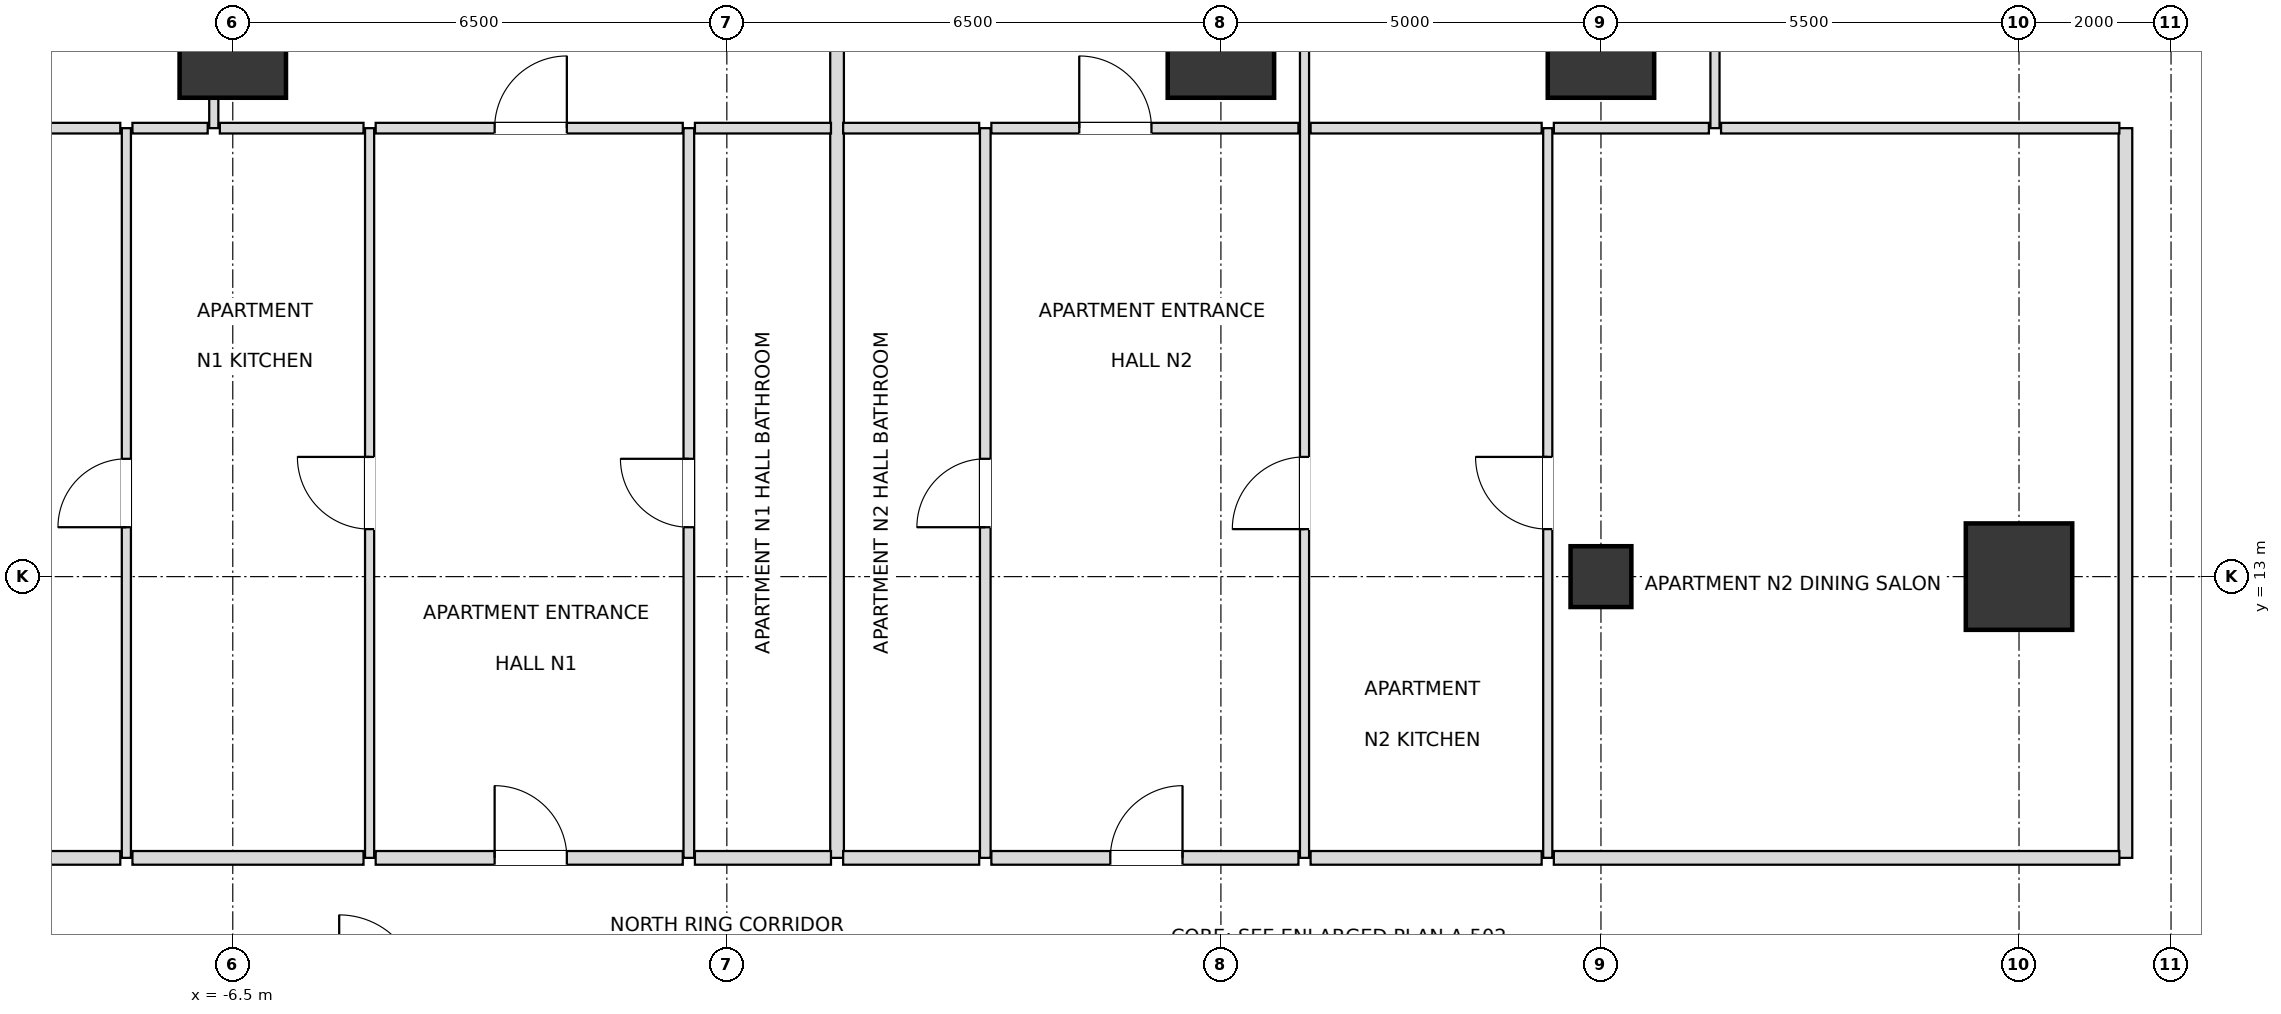
"""IFC4 building model, lengths in metres.
Left out: names, types, materials, properties, quantities, classifications, styles, units other than length and angle.
Written with IfcOpenShell. Run it as: python <this file> out.ifc"""

import sys

from ifc_helpers import new_model, si_unit, direction, frame, frame_2d, origin, origin_2d, place, context, subcontext, project, spatial, rectangle, extrude, element, fill, save


model = new_model("IFC4")
c1 = context("Model", 3, precision=1e-05, world=origin(), true_north=direction((0.0, 1.0)))
c2 = subcontext(c1, "Body", "Model", "MODEL_VIEW")
j1 = project(units=[si_unit("LENGTHUNIT", "METRE"), si_unit("PLANEANGLEUNIT", "RADIAN")], contexts=[c1])
p1 = place(None, origin())
s1 = spatial("IfcSite", under=j1, at=p1, CompositionType="ELEMENT")
p2 = place(p1, origin())
s2 = spatial("IfcBuilding", under=s1, at=p2, CompositionType="ELEMENT")
p3 = place(p2, frame((0.0, 0.0, 90.0)))
s3 = spatial("IfcBuildingStorey", under=s2, at=p3, CompositionType="ELEMENT", Elevation=90.0)
for number, where, z_axis, x_axis in (
    (1, (17.0, 13.0, 0.0), (0.0, 0.0, 1.0), (1.0, 0.0, 0.0)),
    (2, (11.5, 20.0, 0.0), (0.0, 0.0, 1.0), (1.0, 0.0, 0.0)),
    (3, (6.5, 20.0, 0.0), (0.0, 0.0, 1.0), (1.0, 0.0, 0.0)),
    (4, (-6.5, 20.0, 0.0), (0.0, 0.0, 1.0), (1.0, 0.0, 0.0)),
):
    element("IfcColumn", number, at=place(p3, frame(where, z_axis=z_axis, x_axis=x_axis)), inside=s3, PredefinedType="USERDEFINED", context=c2, shape_type="SweptSolid", body=[
        extrude(rectangle(XDim=1.4, YDim=1.4, at=origin_2d()), origin(), (0.0, 0.0, 1.0), 3.6),
    ])
p4 = place(p3, frame((11.5, 13.0, 0.0), z_axis=(0.0, 0.0, 1.0), x_axis=(1.0, 0.0, 0.0)))
e5 = element("IfcColumn", 5, at=p4, inside=s3, PredefinedType="COLUMN", context=c2, shape_type="SweptSolid", body=[
    extrude(rectangle(XDim=0.8, YDim=0.8, at=origin_2d()), origin(), (0.0, 0.0, 1.0), 3.6),
])
p5 = place(p3, frame((-7.9, 9.3, 0.0), z_axis=(0.0, 0.0, 1.0), x_axis=(0.0, 1.0, 0.0)))
e6 = element("IfcWall", 6, at=p5, inside=s3, PredefinedType="PARTITIONING", context=c2, shape_type="SweptSolid", body=[
    extrude(rectangle(XDim=9.6, YDim=0.12, at=frame_2d((4.8, 0.0))), origin(), (0.0, 0.0, 1.0), 2.736),
])
p6 = place(p5, frame((4.35, 0.0, 0.0)))
e7 = element("IfcOpeningElement", 7, at=p6, cuts=e6, PredefinedType="OPENING", context=c2, shape_type="SweptSolid", body=[
    extrude(rectangle(XDim=0.9, YDim=2.1, at=frame_2d((0.45, 1.05))), frame((0.0, 0.07, 0.0), z_axis=(0.0, -1.0, 0.0), x_axis=(1.0, 0.0, 0.0)), (0.0, 0.0, 1.0), 0.14),
])
p7 = place(p3, frame((-6.75, 18.9, 0.0), z_axis=(0.0, 0.0, 1.0), x_axis=(0.0, 1.0, 0.0)))
e8 = element("IfcWall", 8, at=p7, inside=s3, PredefinedType="PARTITIONING", context=c2, shape_type="SweptSolid", body=[
    extrude(rectangle(XDim=6.0, YDim=0.12, at=frame_2d((3.0, 0.0))), origin(), (0.0, 0.0, 1.0), 2.736),
])
p8 = place(p7, frame((2.55, 0.0, 0.0)))
e9 = element("IfcOpeningElement", 9, at=p8, cuts=e8, PredefinedType="OPENING", context=c2, shape_type="SweptSolid", body=[
    extrude(rectangle(XDim=0.9, YDim=2.1, at=frame_2d((0.45, 1.05))), frame((0.0, 0.07, 0.0), z_axis=(0.0, -1.0, 0.0), x_axis=(1.0, 0.0, 0.0)), (0.0, 0.0, 1.0), 0.14),
])
p9 = place(p3, frame((-4.7, 9.3, 0.0), z_axis=(0.0, 0.0, 1.0), x_axis=(0.0, 1.0, 0.0)))
e10 = element("IfcWall", 10, at=p9, inside=s3, PredefinedType="PARTITIONING", context=c2, shape_type="SweptSolid", body=[
    extrude(rectangle(XDim=9.6, YDim=0.12, at=frame_2d((4.8, 0.0))), origin(), (0.0, 0.0, 1.0), 2.868),
])
p10 = place(p9, frame((4.325, 0.0, 0.0)))
e11 = element("IfcOpeningElement", 11, at=p10, cuts=e10, PredefinedType="OPENING", context=c2, shape_type="SweptSolid", body=[
    extrude(rectangle(XDim=0.95, YDim=2.1, at=frame_2d((0.475, 1.05))), frame((0.0, 0.07, 0.0), z_axis=(0.0, -1.0, 0.0), x_axis=(1.0, 0.0, 0.0)), (0.0, 0.0, 1.0), 0.14),
])
p11 = place(p3, frame((-0.5, 9.3, 0.0), z_axis=(0.0, 0.0, 1.0), x_axis=(0.0, 1.0, 0.0)))
e12 = element("IfcWall", 12, at=p11, inside=s3, PredefinedType="PARTITIONING", context=c2, shape_type="SweptSolid", body=[
    extrude(rectangle(XDim=9.6, YDim=0.14, at=frame_2d((4.8, 0.0))), origin(), (0.0, 0.0, 1.0), 2.868),
])
p12 = place(p11, frame((4.35, 0.0, 0.0)))
e13 = element("IfcOpeningElement", 13, at=p12, cuts=e12, PredefinedType="OPENING", context=c2, shape_type="SweptSolid", body=[
    extrude(rectangle(XDim=0.9, YDim=2.1, at=frame_2d((0.45, 1.05))), frame((0.0, 0.08, 0.0), z_axis=(0.0, -1.0, 0.0), x_axis=(1.0, 0.0, 0.0)), (0.0, 0.0, 1.0), 0.16),
])
p13 = place(p3, frame((1.45, 9.3, 0.0), z_axis=(0.0, 0.0, 1.0), x_axis=(0.0, 1.0, 0.0)))
e14 = element("IfcWall", 14, at=p13, inside=s3, PredefinedType="PARTITIONING", context=c2, shape_type="SweptSolid", body=[
    extrude(rectangle(XDim=15.6, YDim=0.18, at=frame_2d((7.8, 0.0))), origin(), (0.0, 0.0, 1.0), 2.736),
])
p14 = place(p3, frame((3.4, 9.3, 0.0), z_axis=(0.0, 0.0, 1.0), x_axis=(0.0, 1.0, 0.0)))
e15 = element("IfcWall", 15, at=p14, inside=s3, PredefinedType="PARTITIONING", context=c2, shape_type="SweptSolid", body=[
    extrude(rectangle(XDim=9.6, YDim=0.14, at=frame_2d((4.8, 0.0))), origin(), (0.0, 0.0, 1.0), 2.868),
])
p15 = place(p14, frame((4.35, 0.0, 0.0)))
e16 = element("IfcOpeningElement", 16, at=p15, cuts=e15, PredefinedType="OPENING", context=c2, shape_type="SweptSolid", body=[
    extrude(rectangle(XDim=0.9, YDim=2.1, at=frame_2d((0.45, 1.05))), frame((0.0, 0.08, 0.0), z_axis=(0.0, -1.0, 0.0), x_axis=(1.0, 0.0, 0.0)), (0.0, 0.0, 1.0), 0.16),
])
p16 = place(p3, frame((7.6, 9.3, 0.0), z_axis=(0.0, 0.0, 1.0), x_axis=(0.0, 1.0, 0.0)))
e17 = element("IfcWall", 17, at=p16, inside=s3, PredefinedType="PARTITIONING", context=c2, shape_type="SweptSolid", body=[
    extrude(rectangle(XDim=15.6, YDim=0.12, at=frame_2d((7.8, 0.0))), origin(), (0.0, 0.0, 1.0), 2.736),
])
p17 = place(p16, frame((4.325, 0.0, 0.0)))
e18 = element("IfcOpeningElement", 18, at=p17, cuts=e17, PredefinedType="OPENING", context=c2, shape_type="SweptSolid", body=[
    extrude(rectangle(XDim=0.95, YDim=2.1, at=frame_2d((0.475, 1.05))), frame((0.0, 0.07, 0.0), z_axis=(0.0, -1.0, 0.0), x_axis=(1.0, 0.0, 0.0)), (0.0, 0.0, 1.0), 0.14),
])
p18 = place(p16, frame((12.15, 0.0, 0.0)))
e19 = element("IfcOpeningElement", 19, at=p18, cuts=e17, PredefinedType="OPENING", context=c2, shape_type="SweptSolid", body=[
    extrude(rectangle(XDim=0.9, YDim=2.1, at=frame_2d((0.45, 1.05))), frame((0.0, 0.07, 0.0), z_axis=(0.0, -1.0, 0.0), x_axis=(1.0, 0.0, 0.0)), (0.0, 0.0, 1.0), 0.14),
])
p19 = place(p3, frame((10.8, 9.3, 0.0), z_axis=(0.0, 0.0, 1.0), x_axis=(0.0, 1.0, 0.0)))
e20 = element("IfcWall", 20, at=p19, inside=s3, PredefinedType="PARTITIONING", context=c2, shape_type="SweptSolid", body=[
    extrude(rectangle(XDim=9.6, YDim=0.12, at=frame_2d((4.8, 0.0))), origin(), (0.0, 0.0, 1.0), 2.736),
])
p20 = place(p19, frame((4.325, 0.0, 0.0)))
e21 = element("IfcOpeningElement", 21, at=p20, cuts=e20, PredefinedType="OPENING", context=c2, shape_type="SweptSolid", body=[
    extrude(rectangle(XDim=0.95, YDim=2.1, at=frame_2d((0.475, 1.05))), frame((0.0, 0.07, 0.0), z_axis=(0.0, -1.0, 0.0), x_axis=(1.0, 0.0, 0.0)), (0.0, 0.0, 1.0), 0.14),
])
p21 = place(p3, frame((13.0, 18.9, 0.0), z_axis=(0.0, 0.0, 1.0), x_axis=(0.0, 1.0, 0.0)))
e22 = element("IfcWall", 22, at=p21, inside=s3, PredefinedType="PARTITIONING", context=c2, shape_type="SweptSolid", body=[
    extrude(rectangle(XDim=6.0, YDim=0.12, at=frame_2d((3.0, 0.0))), origin(), (0.0, 0.0, 1.0), 2.59),
])
p22 = place(p21, frame((2.55, 0.0, 0.0)))
e23 = element("IfcOpeningElement", 23, at=p22, cuts=e22, PredefinedType="OPENING", context=c2, shape_type="SweptSolid", body=[
    extrude(rectangle(XDim=0.9, YDim=2.1, at=frame_2d((0.45, 1.05))), frame((0.0, 0.07, 0.0), z_axis=(0.0, -1.0, 0.0), x_axis=(1.0, 0.0, 0.0)), (0.0, 0.0, 1.0), 0.14),
])
p23 = place(p3, frame((18.4, 9.3, 0.0), z_axis=(0.0, 0.0, 1.0), x_axis=(0.0, 1.0, 0.0)))
e24 = element("IfcWall", 24, at=p23, inside=s3, PredefinedType="PARTITIONING", context=c2, shape_type="SweptSolid", body=[
    extrude(rectangle(XDim=9.6, YDim=0.18, at=frame_2d((4.8, 0.0))), origin(), (0.0, 0.0, 1.0), 2.59),
])
p24 = place(p3, frame((-18.32, 9.3, 0.0), z_axis=(0.0, 0.0, 1.0), x_axis=(1.0, 0.0, 0.0)))
e25 = element("IfcWall", 25, at=p24, inside=s3, PredefinedType="PARTITIONING", context=c2, shape_type="SweptSolid", body=[
    extrude(rectangle(XDim=10.34, YDim=0.18, at=frame_2d((5.17, 0.0))), origin(), (0.0, 0.0, 1.0), 2.736),
])
p25 = place(p3, frame((-7.82, 9.3, 0.0), z_axis=(0.0, 0.0, 1.0), x_axis=(1.0, 0.0, 0.0)))
e26 = element("IfcWall", 26, at=p25, inside=s3, PredefinedType="PARTITIONING", context=c2, shape_type="SweptSolid", body=[
    extrude(rectangle(XDim=3.04, YDim=0.18, at=frame_2d((1.52, 0.0))), origin(), (0.0, 0.0, 1.0), 2.736),
])
p26 = place(p3, frame((-4.62, 9.3, 0.0), z_axis=(0.0, 0.0, 1.0), x_axis=(1.0, 0.0, 0.0)))
e27 = element("IfcWall", 27, at=p26, inside=s3, PredefinedType="PARTITIONING", context=c2, shape_type="SweptSolid", body=[
    extrude(rectangle(XDim=4.04, YDim=0.18, at=frame_2d((2.02, 0.0))), origin(), (0.0, 0.0, 1.0), 3.3),
])
p27 = place(p26, frame((1.565, 0.0, 0.0)))
e28 = element("IfcOpeningElement", 28, at=p27, cuts=e27, PredefinedType="OPENING", context=c2, shape_type="SweptSolid", body=[
    extrude(rectangle(XDim=0.95, YDim=2.15, at=frame_2d((0.475, 1.075))), frame((0.0, 0.1, 0.0), z_axis=(0.0, -1.0, 0.0), x_axis=(1.0, 0.0, 0.0)), (0.0, 0.0, 1.0), 0.2),
])
for number, where, z_axis, x_axis in (
    (29, (-0.42, 9.3, 0.0), (0.0, 0.0, 1.0), (1.0, 0.0, 0.0)),
    (30, (1.53, 9.3, 0.0), (0.0, 0.0, 1.0), (1.0, 0.0, 0.0)),
):
    element("IfcWall", number, at=place(p3, frame(where, z_axis=z_axis, x_axis=x_axis)), inside=s3, PredefinedType="PARTITIONING", context=c2, shape_type="SweptSolid", body=[
        extrude(rectangle(XDim=1.79, YDim=0.18, at=frame_2d((0.895, 0.0))), origin(), (0.0, 0.0, 1.0), 3.3),
    ])
p28 = place(p3, frame((3.48, 9.3, 0.0), z_axis=(0.0, 0.0, 1.0), x_axis=(1.0, 0.0, 0.0)))
e31 = element("IfcWall", 31, at=p28, inside=s3, PredefinedType="PARTITIONING", context=c2, shape_type="SweptSolid", body=[
    extrude(rectangle(XDim=4.04, YDim=0.18, at=frame_2d((2.02, 0.0))), origin(), (0.0, 0.0, 1.0), 2.736),
])
p29 = place(p28, frame((1.565, 0.0, 0.0)))
e32 = element("IfcOpeningElement", 32, at=p29, cuts=e31, PredefinedType="OPENING", context=c2, shape_type="SweptSolid", body=[
    extrude(rectangle(XDim=0.95, YDim=2.15, at=frame_2d((0.475, 1.075))), frame((0.0, 0.1, 0.0), z_axis=(0.0, -1.0, 0.0), x_axis=(1.0, 0.0, 0.0)), (0.0, 0.0, 1.0), 0.2),
])
p30 = place(p3, frame((7.68, 9.3, 0.0), z_axis=(0.0, 0.0, 1.0), x_axis=(1.0, 0.0, 0.0)))
e33 = element("IfcWall", 33, at=p30, inside=s3, PredefinedType="PARTITIONING", context=c2, shape_type="SweptSolid", body=[
    extrude(rectangle(XDim=3.04, YDim=0.18, at=frame_2d((1.52, 0.0))), origin(), (0.0, 0.0, 1.0), 3.3),
])
p31 = place(p3, frame((10.88, 9.3, 0.0), z_axis=(0.0, 0.0, 1.0), x_axis=(1.0, 0.0, 0.0)))
e34 = element("IfcWall", 34, at=p31, inside=s3, PredefinedType="PARTITIONING", context=c2, shape_type="SweptSolid", body=[
    extrude(rectangle(XDim=7.44, YDim=0.18, at=frame_2d((3.72, 0.0))), origin(), (0.0, 0.0, 1.0), 2.736),
])
p32 = place(p3, frame((-12.47, 18.9, 0.0), z_axis=(0.0, 0.0, 1.0), x_axis=(1.0, 0.0, 0.0)))
e35 = element("IfcWall", 35, at=p32, inside=s3, PredefinedType="PARTITIONING", context=c2, shape_type="SweptSolid", body=[
    extrude(rectangle(XDim=4.49, YDim=0.14, at=frame_2d((2.245, 0.0))), origin(), (0.0, 0.0, 1.0), 2.59),
])
p33 = place(p3, frame((-7.82, 18.9, 0.0), z_axis=(0.0, 0.0, 1.0), x_axis=(1.0, 0.0, 0.0)))
e36 = element("IfcWall", 36, at=p33, inside=s3, PredefinedType="PARTITIONING", context=c2, shape_type="SweptSolid", body=[
    extrude(rectangle(XDim=0.99, YDim=0.14, at=frame_2d((0.495, 0.0))), origin(), (0.0, 0.0, 1.0), 3.3),
])
p34 = place(p3, frame((-6.67, 18.9, 0.0), z_axis=(0.0, 0.0, 1.0), x_axis=(1.0, 0.0, 0.0)))
e37 = element("IfcWall", 37, at=p34, inside=s3, PredefinedType="PARTITIONING", context=c2, shape_type="SweptSolid", body=[
    extrude(rectangle(XDim=1.89, YDim=0.14, at=frame_2d((0.945, 0.0))), origin(), (0.0, 0.0, 1.0), 2.736),
])
p35 = place(p3, frame((-4.62, 18.9, 0.0), z_axis=(0.0, 0.0, 1.0), x_axis=(1.0, 0.0, 0.0)))
e38 = element("IfcWall", 38, at=p35, inside=s3, PredefinedType="PARTITIONING", context=c2, shape_type="SweptSolid", body=[
    extrude(rectangle(XDim=4.04, YDim=0.14, at=frame_2d((2.02, 0.0))), origin(), (0.0, 0.0, 1.0), 3.3),
])
p36 = place(p35, frame((1.565, 0.0, 0.0)))
e39 = element("IfcOpeningElement", 39, at=p36, cuts=e38, PredefinedType="OPENING", context=c2, shape_type="SweptSolid", body=[
    extrude(rectangle(XDim=0.95, YDim=2.1, at=frame_2d((0.475, 1.05))), frame((0.0, 0.08, 0.0), z_axis=(0.0, -1.0, 0.0), x_axis=(1.0, 0.0, 0.0)), (0.0, 0.0, 1.0), 0.16),
])
for number, where, z_axis, x_axis in (
    (40, (-0.42, 18.9, 0.0), (0.0, 0.0, 1.0), (1.0, 0.0, 0.0)),
    (41, (1.53, 18.9, 0.0), (0.0, 0.0, 1.0), (1.0, 0.0, 0.0)),
):
    element("IfcWall", number, at=place(p3, frame(where, z_axis=z_axis, x_axis=x_axis)), inside=s3, PredefinedType="PARTITIONING", context=c2, shape_type="SweptSolid", body=[
        extrude(rectangle(XDim=1.79, YDim=0.14, at=frame_2d((0.895, 0.0))), origin(), (0.0, 0.0, 1.0), 3.3),
    ])
p37 = place(p3, frame((3.48, 18.9, 0.0), z_axis=(0.0, 0.0, 1.0), x_axis=(1.0, 0.0, 0.0)))
e42 = element("IfcWall", 42, at=p37, inside=s3, PredefinedType="PARTITIONING", context=c2, shape_type="SweptSolid", body=[
    extrude(rectangle(XDim=4.04, YDim=0.14, at=frame_2d((2.02, 0.0))), origin(), (0.0, 0.0, 1.0), 2.736),
])
p38 = place(p37, frame((1.156, 0.0, 0.0)))
e43 = element("IfcOpeningElement", 43, at=p38, cuts=e42, PredefinedType="OPENING", context=c2, shape_type="SweptSolid", body=[
    extrude(rectangle(XDim=0.95, YDim=2.1, at=frame_2d((0.475, 1.05))), frame((0.0, 0.08, 0.0), z_axis=(0.0, -1.0, 0.0), x_axis=(1.0, 0.0, 0.0)), (0.0, 0.0, 1.0), 0.16),
])
p39 = place(p3, frame((7.68, 18.9, 0.0), z_axis=(0.0, 0.0, 1.0), x_axis=(1.0, 0.0, 0.0)))
e44 = element("IfcWall", 44, at=p39, inside=s3, PredefinedType="PARTITIONING", context=c2, shape_type="SweptSolid", body=[
    extrude(rectangle(XDim=3.04, YDim=0.14, at=frame_2d((1.52, 0.0))), origin(), (0.0, 0.0, 1.0), 3.3),
])
p40 = place(p3, frame((10.88, 18.9, 0.0), z_axis=(0.0, 0.0, 1.0), x_axis=(1.0, 0.0, 0.0)))
e45 = element("IfcWall", 45, at=p40, inside=s3, PredefinedType="PARTITIONING", context=c2, shape_type="SweptSolid", body=[
    extrude(rectangle(XDim=2.04, YDim=0.14, at=frame_2d((1.02, 0.0))), origin(), (0.0, 0.0, 1.0), 2.59),
])
p41 = place(p3, frame((13.08, 18.9, 0.0), z_axis=(0.0, 0.0, 1.0), x_axis=(1.0, 0.0, 0.0)))
e46 = element("IfcWall", 46, at=p41, inside=s3, PredefinedType="PARTITIONING", context=c2, shape_type="SweptSolid", body=[
    extrude(rectangle(XDim=5.24, YDim=0.14, at=frame_2d((2.62, 0.0))), origin(), (0.0, 0.0, 1.0), 2.59),
])
p42 = place(p12, origin())
e47 = element("IfcDoor", 47, at=p42, inside=s3, OperationType="SINGLE_SWING_RIGHT", PredefinedType="DOOR", context=c2, shape_type="SweptSolid", body=[
    extrude(rectangle(XDim=0.9, YDim=2.1, at=frame_2d((0.45, 1.05))), frame((0.0, 0.025, 0.0), z_axis=(0.0, -1.0, 0.0), x_axis=(1.0, 0.0, 0.0)), (0.0, 0.0, 1.0), 0.05),
])
fill(e13, e47)
p43 = place(p27, origin())
e48 = element("IfcDoor", 48, at=p43, inside=s3, OperationType="SINGLE_SWING_LEFT", PredefinedType="DOOR", context=c2, shape_type="SweptSolid", body=[
    extrude(rectangle(XDim=0.95, YDim=2.15, at=frame_2d((0.475, 1.075))), frame((0.0, 0.025, 0.0), z_axis=(0.0, -1.0, 0.0), x_axis=(1.0, 0.0, 0.0)), (0.0, 0.0, 1.0), 0.05),
])
fill(e28, e48)
p44 = place(p10, origin())
e49 = element("IfcDoor", 49, at=p44, inside=s3, OperationType="SINGLE_SWING_RIGHT", PredefinedType="DOOR", context=c2, shape_type="SweptSolid", body=[
    extrude(rectangle(XDim=0.95, YDim=2.1, at=frame_2d((0.475, 1.05))), frame((0.0, 0.025, 0.0), z_axis=(0.0, -1.0, 0.0), x_axis=(1.0, 0.0, 0.0)), (0.0, 0.0, 1.0), 0.05),
])
fill(e11, e49)
p45 = place(p6, origin())
e50 = element("IfcDoor", 50, at=p45, inside=s3, OperationType="SINGLE_SWING_LEFT", PredefinedType="DOOR", context=c2, shape_type="SweptSolid", body=[
    extrude(rectangle(XDim=0.9, YDim=2.1, at=frame_2d((0.45, 1.05))), frame((0.0, 0.025, 0.0), z_axis=(0.0, -1.0, 0.0), x_axis=(1.0, 0.0, 0.0)), (0.0, 0.0, 1.0), 0.05),
])
fill(e7, e50)
p46 = place(p36, origin())
e51 = element("IfcDoor", 51, at=p46, inside=s3, OperationType="SINGLE_SWING_RIGHT", PredefinedType="DOOR", context=c2, shape_type="SweptSolid", body=[
    extrude(rectangle(XDim=0.95, YDim=2.1, at=frame_2d((0.475, 1.05))), frame((0.0, 0.025, 0.0), z_axis=(0.0, -1.0, 0.0), x_axis=(1.0, 0.0, 0.0)), (0.0, 0.0, 1.0), 0.05),
])
fill(e39, e51)
p47 = place(p15, origin())
e52 = element("IfcDoor", 52, at=p47, inside=s3, OperationType="SINGLE_SWING_LEFT", PredefinedType="DOOR", context=c2, shape_type="SweptSolid", body=[
    extrude(rectangle(XDim=0.9, YDim=2.1, at=frame_2d((0.45, 1.05))), frame((0.0, 0.025, 0.0), z_axis=(0.0, -1.0, 0.0), x_axis=(1.0, 0.0, 0.0)), (0.0, 0.0, 1.0), 0.05),
])
fill(e16, e52)
p48 = place(p29, origin())
e53 = element("IfcDoor", 53, at=p48, inside=s3, OperationType="SINGLE_SWING_RIGHT", PredefinedType="DOOR", context=c2, shape_type="SweptSolid", body=[
    extrude(rectangle(XDim=0.95, YDim=2.15, at=frame_2d((0.475, 1.075))), frame((0.0, 0.025, 0.0), z_axis=(0.0, -1.0, 0.0), x_axis=(1.0, 0.0, 0.0)), (0.0, 0.0, 1.0), 0.05),
])
fill(e32, e53)
p49 = place(p17, origin())
e54 = element("IfcDoor", 54, at=p49, inside=s3, OperationType="SINGLE_SWING_LEFT", PredefinedType="DOOR", context=c2, shape_type="SweptSolid", body=[
    extrude(rectangle(XDim=0.95, YDim=2.1, at=frame_2d((0.475, 1.05))), frame((0.0, 0.025, 0.0), z_axis=(0.0, -1.0, 0.0), x_axis=(1.0, 0.0, 0.0)), (0.0, 0.0, 1.0), 0.05),
])
fill(e18, e54)
p50 = place(p20, origin())
e55 = element("IfcDoor", 55, at=p50, inside=s3, OperationType="SINGLE_SWING_RIGHT", PredefinedType="DOOR", context=c2, shape_type="SweptSolid", body=[
    extrude(rectangle(XDim=0.95, YDim=2.1, at=frame_2d((0.475, 1.05))), frame((0.0, 0.025, 0.0), z_axis=(0.0, -1.0, 0.0), x_axis=(1.0, 0.0, 0.0)), (0.0, 0.0, 1.0), 0.05),
])
fill(e21, e55)
p51 = place(p38, origin())
e56 = element("IfcDoor", 56, at=p51, inside=s3, OperationType="SINGLE_SWING_LEFT", PredefinedType="DOOR", context=c2, shape_type="SweptSolid", body=[
    extrude(rectangle(XDim=0.95, YDim=2.1, at=frame_2d((0.475, 1.05))), frame((0.0, 0.025, 0.0), z_axis=(0.0, -1.0, 0.0), x_axis=(1.0, 0.0, 0.0)), (0.0, 0.0, 1.0), 0.05),
])
fill(e43, e56)
save(model, sys.argv[1])
